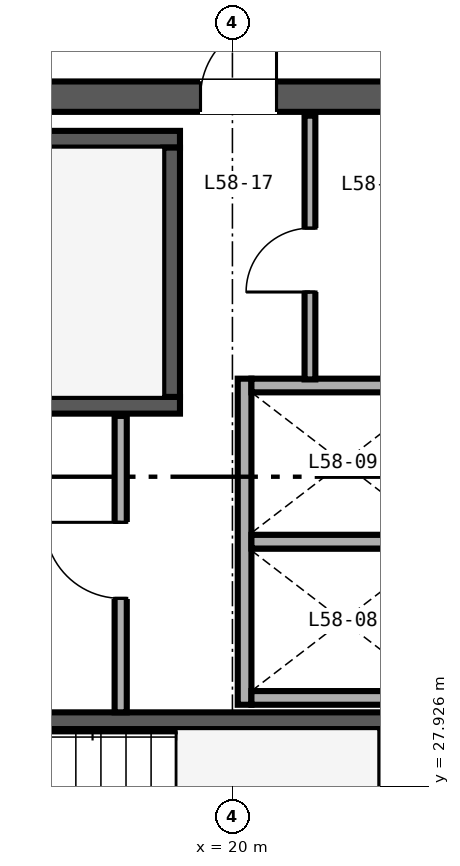
"""IFC4 building model, lengths in metres.
Left out: names, types, materials, properties, quantities, classifications, styles, units other than length and angle.
Written with IfcOpenShell. Run it as: python <this file> out.ifc"""

import sys

from ifc_helpers import new_model, si_unit, direction, frame, frame_2d, origin, place, context, subcontext, project, spatial, rectangle, extrude, source, transform, mapped, element, fill, save


model = new_model("IFC4")
c1 = context("Model", 3, precision=1e-05, world=origin(), true_north=direction((0.0, 1.0)))
c2 = subcontext(c1, "Body", "Model", "MODEL_VIEW")
j1 = project(units=[si_unit("LENGTHUNIT", "METRE"), si_unit("PLANEANGLEUNIT", "RADIAN")], contexts=[c1])
p1 = place(None, origin())
s1 = spatial("IfcSite", under=j1, at=p1, CompositionType="ELEMENT")
p2 = place(p1, origin())
s2 = spatial("IfcBuilding", under=s1, at=p2, CompositionType="ELEMENT")
p3 = place(p2, frame((0.0, 0.0, 232.8)))
s3 = spatial("IfcBuildingStorey", under=s2, at=p3, CompositionType="ELEMENT", Elevation=232.8)
p4 = place(p3, frame((10.8, 37.0, 0.0), z_axis=(0.0, 0.0, 1.0), x_axis=(1.0, 0.0, 0.0)))
e1 = element("IfcWall", 1, at=p4, inside=s3, PredefinedType="SHEAR", context=c2, shape_type="SweptSolid", body=[
    extrude(rectangle(XDim=12.4, YDim=0.4, at=frame_2d((6.2, 0.0))), origin(), (0.0, 0.0, 1.0), 3.38),
])
p5 = place(p4, frame((8.78, 0.0, 0.0)))
e2 = element("IfcOpeningElement", 2, at=p5, cuts=e1, PredefinedType="OPENING", context=c2, shape_type="SweptSolid", body=[
    extrude(rectangle(XDim=1.0, YDim=2.15, at=frame_2d((0.5, 1.075))), frame((0.0, 0.21, 0.0), z_axis=(0.0, -1.0, 0.0), x_axis=(1.0, 0.0, 0.0)), (0.0, 0.0, 1.0), 0.42),
])
p6 = place(p3, frame((11.2, 32.94, 0.0), z_axis=(0.0, 0.0, 1.0), x_axis=(1.0, 0.0, 0.0)))
e3 = element("IfcWall", 3, at=p6, inside=s3, PredefinedType="SHEAR", context=c2, shape_type="SweptSolid", body=[
    extrude(rectangle(XDim=8.11, YDim=0.22, at=frame_2d((4.055, 0.0))), origin(), (0.0, 0.0, 1.0), 3.4),
])
p7 = place(p6, frame((0.72, 0.0, 0.0)))
e4 = element("IfcOpeningElement", 4, at=p7, cuts=e3, PredefinedType="OPENING", context=c2, shape_type="SweptSolid", body=[
    extrude(rectangle(XDim=1.05, YDim=2.15, at=frame_2d((0.525, 1.075))), frame((0.0, 0.12, 0.0), z_axis=(0.0, -1.0, 0.0), x_axis=(1.0, 0.0, 0.0)), (0.0, 0.0, 1.0), 0.24),
])
p8 = place(p3, frame((11.2, 36.44, 0.0), z_axis=(0.0, 0.0, 1.0), x_axis=(1.0, 0.0, 0.0)))
e5 = element("IfcWall", 5, at=p8, inside=s3, PredefinedType="SHEAR", context=c2, shape_type="SweptSolid", body=[
    extrude(rectangle(XDim=8.11, YDim=0.22, at=frame_2d((4.055, 0.0))), origin(), (0.0, 0.0, 1.0), 3.4),
])
p9 = place(p3, frame((19.2, 33.05, 0.0), z_axis=(0.0, 0.0, 1.0), x_axis=(0.0, 1.0, 0.0)))
e6 = element("IfcWall", 6, at=p9, inside=s3, PredefinedType="SHEAR", context=c2, shape_type="SweptSolid", body=[
    extrude(rectangle(XDim=3.28, YDim=0.22, at=frame_2d((1.64, 0.0))), origin(), (0.0, 0.0, 1.0), 3.4),
])
p10 = place(p3, frame((14.18, 28.79, 0.0), z_axis=(0.0, 0.0, 1.0), x_axis=(1.0, 0.0, 0.0)))
e7 = element("IfcWall", 7, at=p10, inside=s3, PredefinedType="SHEAR", context=c2, shape_type="SweptSolid", body=[
    extrude(rectangle(XDim=8.62, YDim=0.22, at=frame_2d((4.31, 0.0))), origin(), (0.0, 0.0, 1.0), 3.4),
])
p11 = place(p3, frame((22.03, 25.4, 0.0), z_axis=(0.0, 0.0, 1.0), x_axis=(0.0, 1.0, 0.0)))
e8 = element("IfcWall", 8, at=p11, inside=s3, PredefinedType="SHEAR", context=c2, shape_type="SweptSolid", body=[
    extrude(rectangle(XDim=3.28, YDim=0.22, at=frame_2d((1.64, 0.0))), origin(), (0.0, 0.0, 1.0), 3.4),
])
p12 = place(p3, frame((20.16, 29.0, 0.0), z_axis=(0.0, 0.0, 1.0), x_axis=(0.0, 1.0, 0.0)))
e9 = element("IfcWall", 9, at=p12, inside=s3, PredefinedType="SOLIDWALL", context=c2, shape_type="SweptSolid", body=[
    extrude(rectangle(XDim=4.29, YDim=0.18, at=frame_2d((2.145, 0.0))), origin(), (0.0, 0.0, 1.0), 3.38),
])
p13 = place(p3, frame((20.25, 29.09, 0.0), z_axis=(0.0, 0.0, 1.0), x_axis=(1.0, 0.0, 0.0)))
e10 = element("IfcWall", 10, at=p13, inside=s3, PredefinedType="SOLIDWALL", context=c2, shape_type="SweptSolid", body=[
    extrude(rectangle(XDim=2.36, YDim=0.18, at=frame_2d((1.18, 0.0))), origin(), (0.0, 0.0, 1.0), 3.38),
])
p14 = place(p3, frame((20.25, 33.2, 0.0), z_axis=(0.0, 0.0, 1.0), x_axis=(1.0, 0.0, 0.0)))
e11 = element("IfcWall", 11, at=p14, inside=s3, PredefinedType="SOLIDWALL", context=c2, shape_type="SweptSolid", body=[
    extrude(rectangle(XDim=2.5, YDim=0.18, at=frame_2d((1.25, 0.0))), origin(), (0.0, 0.0, 1.0), 3.38),
])
p15 = place(p3, frame((20.25, 31.145, 0.0), z_axis=(0.0, 0.0, 1.0), x_axis=(1.0, 0.0, 0.0)))
e12 = element("IfcWall", 12, at=p15, inside=s3, PredefinedType="SOLIDWALL", context=c2, shape_type="SweptSolid", body=[
    extrude(rectangle(XDim=2.36, YDim=0.18, at=frame_2d((1.18, 0.0))), origin(), (0.0, 0.0, 1.0), 3.38),
])
p16 = place(p3, frame((18.53, 28.9, 0.0), z_axis=(0.0, 0.0, 1.0), x_axis=(0.0, 1.0, 0.0)))
e13 = element("IfcWall", 13, at=p16, inside=s3, PredefinedType="PARTITIONING", context=c2, shape_type="SweptSolid", body=[
    extrude(rectangle(XDim=3.9, YDim=0.16, at=frame_2d((1.95, 0.0))), origin(), (0.0, 0.0, 1.0), 3.38),
])
p17 = place(p16, frame((1.5, 0.0, 0.0)))
e14 = element("IfcOpeningElement", 14, at=p17, cuts=e13, PredefinedType="OPENING", context=c2, shape_type="SweptSolid", body=[
    extrude(rectangle(XDim=1.0, YDim=2.15, at=frame_2d((0.5, 1.075))), frame((0.0, 0.09, 0.0), z_axis=(0.0, -1.0, 0.0), x_axis=(1.0, 0.0, 0.0)), (0.0, 0.0, 1.0), 0.18),
])
p18 = place(p3, frame((21.02, 33.28, 0.0), z_axis=(0.0, 0.0, 1.0), x_axis=(0.0, 1.0, 0.0)))
e15 = element("IfcWall", 15, at=p18, inside=s3, PredefinedType="PARTITIONING", context=c2, shape_type="SweptSolid", body=[
    extrude(rectangle(XDim=3.47, YDim=0.142, at=frame_2d((1.735, 0.0))), origin(), (0.0, 0.0, 1.0), 3.38),
])
p19 = place(p18, frame((1.15, 0.0, 0.0)))
e16 = element("IfcOpeningElement", 16, at=p19, cuts=e15, PredefinedType="OPENING", context=c2, shape_type="SweptSolid", body=[
    extrude(rectangle(XDim=0.84, YDim=2.1, at=frame_2d((0.42, 1.05))), frame((0.0, 0.081, 0.0), z_axis=(0.0, -1.0, 0.0), x_axis=(1.0, 0.0, 0.0)), (0.0, 0.0, 1.0), 0.162),
])
m1 = source(origin(), c2, "Body", "SweptSolid", [
    extrude(rectangle(XDim=1.0, YDim=2.15, at=frame_2d((0.5, 1.075))), frame((0.0, 0.025, 0.0), z_axis=(0.0, -1.0, 0.0), x_axis=(1.0, 0.0, 0.0)), (0.0, 0.0, 1.0), 0.05),
])
p20 = place(p17, origin())
e17 = element("IfcDoor", 17, at=p20, inside=s3, OperationType="SINGLE_SWING_RIGHT", PredefinedType="DOOR", context=c2, shape_type="MappedRepresentation", body=[
    mapped(m1, transform((0.0, 0.0, 0.0), scale=1.0)),
])
fill(e14, e17)
m2 = source(origin(), c2, "Body", "SweptSolid", [
    extrude(rectangle(XDim=0.84, YDim=2.1, at=frame_2d((0.42, 1.05))), frame((0.0, 0.025, 0.0), z_axis=(0.0, -1.0, 0.0), x_axis=(1.0, 0.0, 0.0)), (0.0, 0.0, 1.0), 0.05),
])
p21 = place(p19, origin())
e18 = element("IfcDoor", 18, at=p21, inside=s3, OperationType="SINGLE_SWING_LEFT", PredefinedType="DOOR", context=c2, shape_type="MappedRepresentation", body=[
    mapped(m2, transform((0.0, 0.0, 0.0), scale=1.0)),
])
fill(e16, e18)
p22 = place(p5, origin())
e19 = element("IfcDoor", 19, at=p22, inside=s3, OperationType="SINGLE_SWING_RIGHT", PredefinedType="DOOR", context=c2, shape_type="MappedRepresentation", body=[
    mapped(m1, transform((0.0, 0.0, 0.0), scale=1.0)),
])
fill(e2, e19)
save(model, sys.argv[1])
